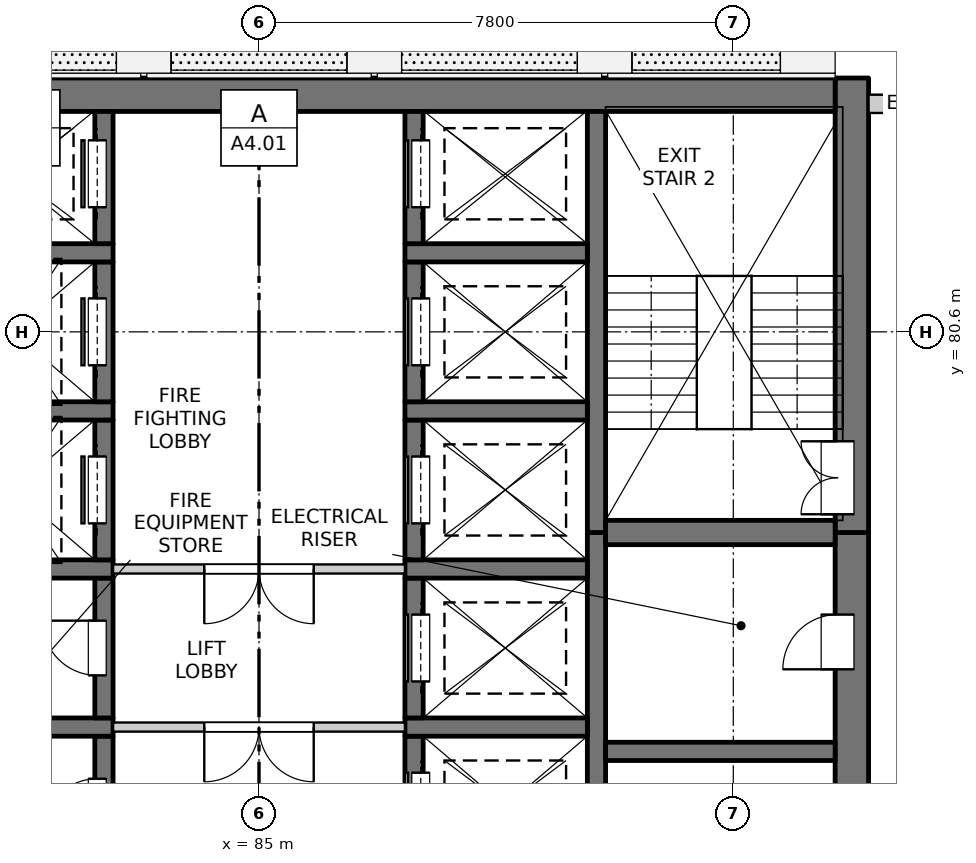
"""IFC4 building model, lengths in metres.
Left out: names, types, materials, properties, quantities, classifications, styles, units other than length and angle.
Written with IfcOpenShell. Run it as: python <this file> out.ifc"""

import sys

from ifc_helpers import new_model, si_unit, direction, frame, frame_2d, origin, place, context, subcontext, project, spatial, rectangle, extrude, element, fill, save


model = new_model("IFC4")
c1 = context("Model", 3, precision=1e-05, world=origin(), true_north=direction((0.0, 1.0)))
c2 = subcontext(c1, "Body", "Model", "MODEL_VIEW")
j1 = project(units=[si_unit("LENGTHUNIT", "METRE"), si_unit("PLANEANGLEUNIT", "RADIAN")], contexts=[c1])
p1 = place(None, origin())
s1 = spatial("IfcSite", under=j1, at=p1, CompositionType="ELEMENT")
p2 = place(p1, origin())
s2 = spatial("IfcBuilding", under=s1, at=p2, CompositionType="ELEMENT")
p3 = place(p2, frame((0.0, 0.0, 182.6)))
s3 = spatial("IfcBuildingStorey", under=s2, at=p3, CompositionType="ELEMENT", Elevation=182.6)
p4 = place(p3, frame((94.75, 61.95, -0.25), z_axis=(0.0, 0.0, 1.0), x_axis=(0.0, 1.0, 0.0)))
e1 = element("IfcWall", 1, at=p4, inside=s3, PredefinedType="SOLIDWALL", context=c2, shape_type="SweptSolid", body=[
    extrude(rectangle(XDim=15.35, YDim=0.55, at=frame_2d((7.675, 0.0))), origin(), (0.0, 0.0, 1.0), 3.4),
])
p5 = place(p4, frame((0.925, 0.0, 0.25)))
e2 = element("IfcOpeningElement", 2, at=p5, cuts=e1, PredefinedType="OPENING", context=c2, shape_type="SweptSolid", body=[
    extrude(rectangle(XDim=0.9, YDim=2.1, at=frame_2d((0.45, 1.05))), frame((0.0, 0.285, 0.0), z_axis=(0.0, -1.0, 0.0), x_axis=(1.0, 0.0, 0.0)), (0.0, 0.0, 1.0), 0.57),
])
p6 = place(p4, frame((6.8, 0.0, 0.25)))
e3 = element("IfcOpeningElement", 3, at=p6, cuts=e1, PredefinedType="OPENING", context=c2, shape_type="SweptSolid", body=[
    extrude(rectangle(XDim=0.9, YDim=2.1, at=frame_2d((0.45, 1.05))), frame((0.0, 0.285, 0.0), z_axis=(0.0, -1.0, 0.0), x_axis=(1.0, 0.0, 0.0)), (0.0, 0.0, 1.0), 0.57),
])
p7 = place(p4, frame((13.1, 0.0, 0.25)))
e4 = element("IfcOpeningElement", 4, at=p7, cuts=e1, PredefinedType="OPENING", context=c2, shape_type="SweptSolid", body=[
    extrude(rectangle(XDim=0.9, YDim=2.1, at=frame_2d((0.45, 1.05))), frame((0.0, 0.285, 0.0), z_axis=(0.0, -1.0, 0.0), x_axis=(1.0, 0.0, 0.0)), (0.0, 0.0, 1.0), 0.57),
])
p8 = place(p3, frame((94.75, 77.3, -0.25), z_axis=(0.0, 0.0, 1.0), x_axis=(0.0, 1.0, 0.0)))
e5 = element("IfcWall", 5, at=p8, inside=s3, PredefinedType="SOLIDWALL", context=c2, shape_type="SweptSolid", body=[
    extrude(rectangle(XDim=7.475, YDim=0.55, at=frame_2d((3.737, 0.0))), origin(), (0.0, 0.0, 1.0), 3.4),
])
p9 = place(p8, frame((0.3, 0.0, 0.25)))
e6 = element("IfcOpeningElement", 6, at=p9, cuts=e5, PredefinedType="OPENING", context=c2, shape_type="SweptSolid", body=[
    extrude(rectangle(XDim=1.2, YDim=2.1, at=frame_2d((0.6, 1.05))), frame((0.0, 0.285, 0.0), z_axis=(0.0, -1.0, 0.0), x_axis=(1.0, 0.0, 0.0)), (0.0, 0.0, 1.0), 0.57),
])
p10 = place(p3, frame((75.525, 84.5, -0.25), z_axis=(0.0, 0.0, 1.0), x_axis=(1.0, 0.0, 0.0)))
e7 = element("IfcWall", 7, at=p10, inside=s3, PredefinedType="SOLIDWALL", context=c2, shape_type="SweptSolid", body=[
    extrude(rectangle(XDim=18.95, YDim=0.55, at=frame_2d((9.475, 0.0))), origin(), (0.0, 0.0, 1.0), 3.4),
])
p11 = place(p3, frame((90.55, 61.95, -0.25), z_axis=(0.0, 0.0, 1.0), x_axis=(0.0, 1.0, 0.0)))
e8 = element("IfcWall", 8, at=p11, inside=s3, PredefinedType="SOLIDWALL", context=c2, shape_type="SweptSolid", body=[
    extrude(rectangle(XDim=15.35, YDim=0.3, at=frame_2d((7.675, 0.0))), origin(), (0.0, 0.0, 1.0), 3.4),
])
p12 = place(p3, frame((90.55, 77.3, -0.25), z_axis=(0.0, 0.0, 1.0), x_axis=(0.0, 1.0, 0.0)))
e9 = element("IfcWall", 9, at=p12, inside=s3, PredefinedType="SOLIDWALL", context=c2, shape_type="SweptSolid", body=[
    extrude(rectangle(XDim=6.925, YDim=0.3, at=frame_2d((3.462, 0.0))), origin(), (0.0, 0.0, 1.0), 3.4),
])
p13 = place(p3, frame((82.45, 71.65, -0.25), z_axis=(0.0, 0.0, 1.0), x_axis=(0.0, 1.0, 0.0)))
e10 = element("IfcWall", 10, at=p13, inside=s3, PredefinedType="SOLIDWALL", context=c2, shape_type="SweptSolid", body=[
    extrude(rectangle(XDim=2.3, YDim=0.3, at=frame_2d((1.15, 0.0))), origin(), (0.0, 0.0, 1.0), 3.4),
])
p14 = place(p13, frame((0.7, 0.0, 0.25)))
e11 = element("IfcOpeningElement", 11, at=p14, cuts=e10, PredefinedType="OPENING", context=c2, shape_type="SweptSolid", body=[
    extrude(rectangle(XDim=0.9, YDim=2.1, at=frame_2d((0.45, 1.05))), frame((0.0, 0.16, 0.0), z_axis=(0.0, -1.0, 0.0), x_axis=(1.0, 0.0, 0.0)), (0.0, 0.0, 1.0), 0.32),
])
p15 = place(p3, frame((79.6, 74.1, -0.25), z_axis=(0.0, 0.0, 1.0), x_axis=(1.0, 0.0, 0.0)))
e12 = element("IfcWall", 12, at=p15, inside=s3, PredefinedType="SOLIDWALL", context=c2, shape_type="SweptSolid", body=[
    extrude(rectangle(XDim=3.0, YDim=0.3, at=frame_2d((1.5, 0.0))), origin(), (0.0, 0.0, 1.0), 3.4),
])
p16 = place(p3, frame((82.45, 74.25, -0.25), z_axis=(0.0, 0.0, 1.0), x_axis=(0.0, 1.0, 0.0)))
e13 = element("IfcWall", 13, at=p16, inside=s3, PredefinedType="SOLIDWALL", context=c2, shape_type="SweptSolid", body=[
    extrude(rectangle(XDim=2.3, YDim=0.3, at=frame_2d((1.15, 0.0))), origin(), (0.0, 0.0, 1.0), 3.4),
])
p17 = place(p16, frame((0.7, 0.0, 0.25)))
e14 = element("IfcOpeningElement", 14, at=p17, cuts=e13, PredefinedType="OPENING", context=c2, shape_type="SweptSolid", body=[
    extrude(rectangle(XDim=0.9, YDim=2.1, at=frame_2d((0.45, 1.05))), frame((0.0, 0.16, 0.0), z_axis=(0.0, -1.0, 0.0), x_axis=(1.0, 0.0, 0.0)), (0.0, 0.0, 1.0), 0.32),
])
p18 = place(p3, frame((79.6, 76.7, -0.25), z_axis=(0.0, 0.0, 1.0), x_axis=(1.0, 0.0, 0.0)))
e15 = element("IfcWall", 15, at=p18, inside=s3, PredefinedType="SOLIDWALL", context=c2, shape_type="SweptSolid", body=[
    extrude(rectangle(XDim=3.0, YDim=0.3, at=frame_2d((1.5, 0.0))), origin(), (0.0, 0.0, 1.0), 3.4),
])
p19 = place(p3, frame((82.45, 76.85, -0.25), z_axis=(0.0, 0.0, 1.0), x_axis=(0.0, 1.0, 0.0)))
e16 = element("IfcWall", 16, at=p19, inside=s3, PredefinedType="SOLIDWALL", context=c2, shape_type="SweptSolid", body=[
    extrude(rectangle(XDim=2.3, YDim=0.3, at=frame_2d((1.15, 0.0))), origin(), (0.0, 0.0, 1.0), 3.4),
])
p20 = place(p19, frame((0.6, 0.0, 0.25)))
e17 = element("IfcOpeningElement", 17, at=p20, cuts=e16, PredefinedType="OPENING", context=c2, shape_type="SweptSolid", body=[
    extrude(rectangle(XDim=1.1, YDim=2.1, at=frame_2d((0.55, 1.05))), frame((0.0, 0.16, 0.0), z_axis=(0.0, -1.0, 0.0), x_axis=(1.0, 0.0, 0.0)), (0.0, 0.0, 1.0), 0.32),
])
p21 = place(p3, frame((79.6, 79.3, -0.25), z_axis=(0.0, 0.0, 1.0), x_axis=(1.0, 0.0, 0.0)))
e18 = element("IfcWall", 18, at=p21, inside=s3, PredefinedType="SOLIDWALL", context=c2, shape_type="SweptSolid", body=[
    extrude(rectangle(XDim=3.0, YDim=0.3, at=frame_2d((1.5, 0.0))), origin(), (0.0, 0.0, 1.0), 3.4),
])
p22 = place(p3, frame((82.45, 79.45, -0.25), z_axis=(0.0, 0.0, 1.0), x_axis=(0.0, 1.0, 0.0)))
e19 = element("IfcWall", 19, at=p22, inside=s3, PredefinedType="SOLIDWALL", context=c2, shape_type="SweptSolid", body=[
    extrude(rectangle(XDim=2.3, YDim=0.3, at=frame_2d((1.15, 0.0))), origin(), (0.0, 0.0, 1.0), 3.4),
])
p23 = place(p22, frame((0.6, 0.0, 0.25)))
e20 = element("IfcOpeningElement", 20, at=p23, cuts=e19, PredefinedType="OPENING", context=c2, shape_type="SweptSolid", body=[
    extrude(rectangle(XDim=1.1, YDim=2.1, at=frame_2d((0.55, 1.05))), frame((0.0, 0.16, 0.0), z_axis=(0.0, -1.0, 0.0), x_axis=(1.0, 0.0, 0.0)), (0.0, 0.0, 1.0), 0.32),
])
p24 = place(p3, frame((79.6, 81.9, -0.25), z_axis=(0.0, 0.0, 1.0), x_axis=(1.0, 0.0, 0.0)))
e21 = element("IfcWall", 21, at=p24, inside=s3, PredefinedType="SOLIDWALL", context=c2, shape_type="SweptSolid", body=[
    extrude(rectangle(XDim=3.0, YDim=0.3, at=frame_2d((1.5, 0.0))), origin(), (0.0, 0.0, 1.0), 3.4),
])
p25 = place(p3, frame((82.45, 82.05, -0.25), z_axis=(0.0, 0.0, 1.0), x_axis=(0.0, 1.0, 0.0)))
e22 = element("IfcWall", 22, at=p25, inside=s3, PredefinedType="SOLIDWALL", context=c2, shape_type="SweptSolid", body=[
    extrude(rectangle(XDim=2.175, YDim=0.3, at=frame_2d((1.087, 0.0))), origin(), (0.0, 0.0, 1.0), 3.4),
])
p26 = place(p25, frame((0.6, 0.0, 0.25)))
e23 = element("IfcOpeningElement", 23, at=p26, cuts=e22, PredefinedType="OPENING", context=c2, shape_type="SweptSolid", body=[
    extrude(rectangle(XDim=1.1, YDim=2.1, at=frame_2d((0.55, 1.05))), frame((0.0, 0.16, 0.0), z_axis=(0.0, -1.0, 0.0), x_axis=(1.0, 0.0, 0.0)), (0.0, 0.0, 1.0), 0.32),
])
p27 = place(p3, frame((87.55, 71.65, -0.25), z_axis=(0.0, 0.0, 1.0), x_axis=(0.0, 1.0, 0.0)))
e24 = element("IfcWall", 24, at=p27, inside=s3, PredefinedType="SOLIDWALL", context=c2, shape_type="SweptSolid", body=[
    extrude(rectangle(XDim=2.3, YDim=0.3, at=frame_2d((1.15, 0.0))), origin(), (0.0, 0.0, 1.0), 3.4),
])
p28 = place(p27, frame((0.6, 0.0, 0.25)))
e25 = element("IfcOpeningElement", 25, at=p28, cuts=e24, PredefinedType="OPENING", context=c2, shape_type="SweptSolid", body=[
    extrude(rectangle(XDim=1.1, YDim=2.1, at=frame_2d((0.55, 1.05))), frame((0.0, 0.16, 0.0), z_axis=(0.0, -1.0, 0.0), x_axis=(1.0, 0.0, 0.0)), (0.0, 0.0, 1.0), 0.32),
])
p29 = place(p3, frame((87.4, 74.1, -0.25), z_axis=(0.0, 0.0, 1.0), x_axis=(1.0, 0.0, 0.0)))
e26 = element("IfcWall", 26, at=p29, inside=s3, PredefinedType="SOLIDWALL", context=c2, shape_type="SweptSolid", body=[
    extrude(rectangle(XDim=3.0, YDim=0.3, at=frame_2d((1.5, 0.0))), origin(), (0.0, 0.0, 1.0), 3.4),
])
p30 = place(p3, frame((87.55, 74.25, -0.25), z_axis=(0.0, 0.0, 1.0), x_axis=(0.0, 1.0, 0.0)))
e27 = element("IfcWall", 27, at=p30, inside=s3, PredefinedType="SOLIDWALL", context=c2, shape_type="SweptSolid", body=[
    extrude(rectangle(XDim=2.3, YDim=0.3, at=frame_2d((1.15, 0.0))), origin(), (0.0, 0.0, 1.0), 3.4),
])
p31 = place(p30, frame((0.6, 0.0, 0.25)))
e28 = element("IfcOpeningElement", 28, at=p31, cuts=e27, PredefinedType="OPENING", context=c2, shape_type="SweptSolid", body=[
    extrude(rectangle(XDim=1.1, YDim=2.1, at=frame_2d((0.55, 1.05))), frame((0.0, 0.16, 0.0), z_axis=(0.0, -1.0, 0.0), x_axis=(1.0, 0.0, 0.0)), (0.0, 0.0, 1.0), 0.32),
])
p32 = place(p3, frame((87.4, 76.7, -0.25), z_axis=(0.0, 0.0, 1.0), x_axis=(1.0, 0.0, 0.0)))
e29 = element("IfcWall", 29, at=p32, inside=s3, PredefinedType="SOLIDWALL", context=c2, shape_type="SweptSolid", body=[
    extrude(rectangle(XDim=3.0, YDim=0.3, at=frame_2d((1.5, 0.0))), origin(), (0.0, 0.0, 1.0), 3.4),
])
p33 = place(p3, frame((87.55, 76.85, -0.25), z_axis=(0.0, 0.0, 1.0), x_axis=(0.0, 1.0, 0.0)))
e30 = element("IfcWall", 30, at=p33, inside=s3, PredefinedType="SOLIDWALL", context=c2, shape_type="SweptSolid", body=[
    extrude(rectangle(XDim=2.3, YDim=0.3, at=frame_2d((1.15, 0.0))), origin(), (0.0, 0.0, 1.0), 3.4),
])
p34 = place(p33, frame((0.6, 0.0, 0.25)))
e31 = element("IfcOpeningElement", 31, at=p34, cuts=e30, PredefinedType="OPENING", context=c2, shape_type="SweptSolid", body=[
    extrude(rectangle(XDim=1.1, YDim=2.1, at=frame_2d((0.55, 1.05))), frame((0.0, 0.16, 0.0), z_axis=(0.0, -1.0, 0.0), x_axis=(1.0, 0.0, 0.0)), (0.0, 0.0, 1.0), 0.32),
])
p35 = place(p3, frame((87.4, 79.3, -0.25), z_axis=(0.0, 0.0, 1.0), x_axis=(1.0, 0.0, 0.0)))
e32 = element("IfcWall", 32, at=p35, inside=s3, PredefinedType="SOLIDWALL", context=c2, shape_type="SweptSolid", body=[
    extrude(rectangle(XDim=3.0, YDim=0.3, at=frame_2d((1.5, 0.0))), origin(), (0.0, 0.0, 1.0), 3.4),
])
p36 = place(p3, frame((87.55, 79.45, -0.25), z_axis=(0.0, 0.0, 1.0), x_axis=(0.0, 1.0, 0.0)))
e33 = element("IfcWall", 33, at=p36, inside=s3, PredefinedType="SOLIDWALL", context=c2, shape_type="SweptSolid", body=[
    extrude(rectangle(XDim=2.3, YDim=0.3, at=frame_2d((1.15, 0.0))), origin(), (0.0, 0.0, 1.0), 3.4),
])
p37 = place(p36, frame((0.6, 0.0, 0.25)))
e34 = element("IfcOpeningElement", 34, at=p37, cuts=e33, PredefinedType="OPENING", context=c2, shape_type="SweptSolid", body=[
    extrude(rectangle(XDim=1.1, YDim=2.1, at=frame_2d((0.55, 1.05))), frame((0.0, 0.16, 0.0), z_axis=(0.0, -1.0, 0.0), x_axis=(1.0, 0.0, 0.0)), (0.0, 0.0, 1.0), 0.32),
])
p38 = place(p3, frame((87.4, 81.9, -0.25), z_axis=(0.0, 0.0, 1.0), x_axis=(1.0, 0.0, 0.0)))
e35 = element("IfcWall", 35, at=p38, inside=s3, PredefinedType="SOLIDWALL", context=c2, shape_type="SweptSolid", body=[
    extrude(rectangle(XDim=3.0, YDim=0.3, at=frame_2d((1.5, 0.0))), origin(), (0.0, 0.0, 1.0), 3.4),
])
p39 = place(p3, frame((87.55, 82.05, -0.25), z_axis=(0.0, 0.0, 1.0), x_axis=(0.0, 1.0, 0.0)))
e36 = element("IfcWall", 36, at=p39, inside=s3, PredefinedType="SOLIDWALL", context=c2, shape_type="SweptSolid", body=[
    extrude(rectangle(XDim=2.175, YDim=0.3, at=frame_2d((1.087, 0.0))), origin(), (0.0, 0.0, 1.0), 3.4),
])
p40 = place(p39, frame((0.6, 0.0, 0.25)))
e37 = element("IfcOpeningElement", 37, at=p40, cuts=e36, PredefinedType="OPENING", context=c2, shape_type="SweptSolid", body=[
    extrude(rectangle(XDim=1.1, YDim=2.1, at=frame_2d((0.55, 1.05))), frame((0.0, 0.16, 0.0), z_axis=(0.0, -1.0, 0.0), x_axis=(1.0, 0.0, 0.0)), (0.0, 0.0, 1.0), 0.32),
])
p41 = place(p3, frame((90.7, 73.7, -0.25), z_axis=(0.0, 0.0, 1.0), x_axis=(1.0, 0.0, 0.0)))
e38 = element("IfcWall", 38, at=p41, inside=s3, PredefinedType="SOLIDWALL", context=c2, shape_type="SweptSolid", body=[
    extrude(rectangle(XDim=3.775, YDim=0.3, at=frame_2d((1.888, 0.0))), origin(), (0.0, 0.0, 1.0), 3.4),
])
p42 = place(p3, frame((90.7, 77.3, -0.25), z_axis=(0.0, 0.0, 1.0), x_axis=(1.0, 0.0, 0.0)))
e39 = element("IfcWall", 39, at=p42, inside=s3, PredefinedType="SOLIDWALL", context=c2, shape_type="SweptSolid", body=[
    extrude(rectangle(XDim=3.775, YDim=0.4, at=frame_2d((1.888, 0.0))), origin(), (0.0, 0.0, 1.0), 3.4),
])
p43 = place(p3, frame((95.025, 84.35, 0.0), z_axis=(0.0, 0.0, 1.0), x_axis=(1.0, 0.0, 0.0)))
e40 = element("IfcWall", 40, at=p43, inside=s3, PredefinedType="SOLIDWALL", context=c2, shape_type="SweptSolid", body=[
    extrude(rectangle(XDim=1.3, YDim=0.3, at=frame_2d((0.65, 0.0))), origin(), (0.0, 0.0, 1.0), 2.7),
])
p44 = place(p3, frame((82.6, 74.1, 0.0), z_axis=(0.0, 0.0, 1.0), x_axis=(1.0, 0.0, 0.0)))
e41 = element("IfcWall", 41, at=p44, inside=s3, PredefinedType="PARTITIONING", context=c2, shape_type="SweptSolid", body=[
    extrude(rectangle(XDim=4.8, YDim=0.15, at=frame_2d((2.4, 0.0))), origin(), (0.0, 0.0, 1.0), 3.15),
])
p45 = place(p44, frame((1.5, 0.0, 0.0)))
e42 = element("IfcOpeningElement", 42, at=p45, cuts=e41, PredefinedType="OPENING", context=c2, shape_type="SweptSolid", body=[
    extrude(rectangle(XDim=1.8, YDim=2.1, at=frame_2d((0.9, 1.05))), frame((0.0, 0.085, 0.0), z_axis=(0.0, -1.0, 0.0), x_axis=(1.0, 0.0, 0.0)), (0.0, 0.0, 1.0), 0.17),
])
p46 = place(p3, frame((82.6, 76.7, 0.0), z_axis=(0.0, 0.0, 1.0), x_axis=(1.0, 0.0, 0.0)))
e43 = element("IfcWall", 43, at=p46, inside=s3, PredefinedType="PARTITIONING", context=c2, shape_type="SweptSolid", body=[
    extrude(rectangle(XDim=4.8, YDim=0.15, at=frame_2d((2.4, 0.0))), origin(), (0.0, 0.0, 1.0), 3.15),
])
p47 = place(p46, frame((1.5, 0.0, 0.0)))
e44 = element("IfcOpeningElement", 44, at=p47, cuts=e43, PredefinedType="OPENING", context=c2, shape_type="SweptSolid", body=[
    extrude(rectangle(XDim=1.8, YDim=2.1, at=frame_2d((0.9, 1.05))), frame((0.0, 0.085, 0.0), z_axis=(0.0, -1.0, 0.0), x_axis=(1.0, 0.0, 0.0)), (0.0, 0.0, 1.0), 0.17),
])
p48 = place(p14, origin())
e45 = element("IfcDoor", 45, at=p48, inside=s3, OperationType="SINGLE_SWING_LEFT", PredefinedType="DOOR", context=c2, shape_type="SweptSolid", body=[
    extrude(rectangle(XDim=0.9, YDim=2.1, at=frame_2d((0.45, 1.05))), frame((0.0, 0.135, 0.0), z_axis=(0.0, -1.0, 0.0), x_axis=(1.0, 0.0, 0.0)), (0.0, 0.0, 1.0), 0.05),
])
fill(e11, e45)
p49 = place(p28, origin())
e46 = element("IfcDoor", 46, at=p49, inside=s3, OperationType="SLIDING_TO_LEFT", PredefinedType="DOOR", context=c2, shape_type="SweptSolid", body=[
    extrude(rectangle(XDim=1.1, YDim=2.1, at=frame_2d((0.55, 1.05))), frame((0.0, -0.085, 0.0), z_axis=(0.0, -1.0, 0.0), x_axis=(1.0, 0.0, 0.0)), (0.0, 0.0, 1.0), 0.05),
])
fill(e25, e46)
p50 = place(p45, origin())
e47 = element("IfcDoor", 47, at=p50, inside=s3, OperationType="DOUBLE_DOOR_SINGLE_SWING", PredefinedType="DOOR", context=c2, shape_type="SweptSolid", body=[
    extrude(rectangle(XDim=1.8, YDim=2.1, at=frame_2d((0.9, 1.05))), frame((0.0, 0.025, 0.0), z_axis=(0.0, -1.0, 0.0), x_axis=(1.0, 0.0, 0.0)), (0.0, 0.0, 1.0), 0.05),
])
fill(e42, e47)
p51 = place(p17, origin())
e48 = element("IfcDoor", 48, at=p51, inside=s3, OperationType="SINGLE_SWING_RIGHT", PredefinedType="DOOR", context=c2, shape_type="SweptSolid", body=[
    extrude(rectangle(XDim=0.9, YDim=2.1, at=frame_2d((0.45, 1.05))), frame((0.0, 0.135, 0.0), z_axis=(0.0, -1.0, 0.0), x_axis=(1.0, 0.0, 0.0)), (0.0, 0.0, 1.0), 0.05),
])
fill(e14, e48)
p52 = place(p31, origin())
e49 = element("IfcDoor", 49, at=p52, inside=s3, OperationType="SLIDING_TO_LEFT", PredefinedType="DOOR", context=c2, shape_type="SweptSolid", body=[
    extrude(rectangle(XDim=1.1, YDim=2.1, at=frame_2d((0.55, 1.05))), frame((0.0, -0.085, 0.0), z_axis=(0.0, -1.0, 0.0), x_axis=(1.0, 0.0, 0.0)), (0.0, 0.0, 1.0), 0.05),
])
fill(e28, e49)
p53 = place(p7, origin())
e50 = element("IfcDoor", 50, at=p53, inside=s3, OperationType="SINGLE_SWING_LEFT", PredefinedType="DOOR", context=c2, shape_type="SweptSolid", body=[
    extrude(rectangle(XDim=0.9, YDim=2.1, at=frame_2d((0.45, 1.05))), frame((0.0, 0.26, 0.0), z_axis=(0.0, -1.0, 0.0), x_axis=(1.0, 0.0, 0.0)), (0.0, 0.0, 1.0), 0.05),
])
fill(e4, e50)
p54 = place(p47, origin())
e51 = element("IfcDoor", 51, at=p54, inside=s3, OperationType="DOUBLE_DOOR_SINGLE_SWING", PredefinedType="DOOR", context=c2, shape_type="SweptSolid", body=[
    extrude(rectangle(XDim=1.8, YDim=2.1, at=frame_2d((0.9, 1.05))), frame((0.0, 0.025, 0.0), z_axis=(0.0, -1.0, 0.0), x_axis=(1.0, 0.0, 0.0)), (0.0, 0.0, 1.0), 0.05),
])
fill(e44, e51)
p55 = place(p20, origin())
e52 = element("IfcDoor", 52, at=p55, inside=s3, OperationType="SLIDING_TO_LEFT", PredefinedType="DOOR", context=c2, shape_type="SweptSolid", body=[
    extrude(rectangle(XDim=1.1, YDim=2.1, at=frame_2d((0.55, 1.05))), frame((0.0, 0.135, 0.0), z_axis=(0.0, -1.0, 0.0), x_axis=(1.0, 0.0, 0.0)), (0.0, 0.0, 1.0), 0.05),
])
fill(e17, e52)
p56 = place(p34, origin())
e53 = element("IfcDoor", 53, at=p56, inside=s3, OperationType="SLIDING_TO_LEFT", PredefinedType="DOOR", context=c2, shape_type="SweptSolid", body=[
    extrude(rectangle(XDim=1.1, YDim=2.1, at=frame_2d((0.55, 1.05))), frame((0.0, -0.085, 0.0), z_axis=(0.0, -1.0, 0.0), x_axis=(1.0, 0.0, 0.0)), (0.0, 0.0, 1.0), 0.05),
])
fill(e31, e53)
p57 = place(p9, origin())
e54 = element("IfcDoor", 54, at=p57, inside=s3, OperationType="DOUBLE_DOOR_SINGLE_SWING", PredefinedType="DOOR", context=c2, shape_type="SweptSolid", body=[
    extrude(rectangle(XDim=1.2, YDim=2.1, at=frame_2d((0.6, 1.05))), frame((0.0, 0.26, 0.0), z_axis=(0.0, -1.0, 0.0), x_axis=(1.0, 0.0, 0.0)), (0.0, 0.0, 1.0), 0.05),
])
fill(e6, e54)
p58 = place(p23, origin())
e55 = element("IfcDoor", 55, at=p58, inside=s3, OperationType="SLIDING_TO_LEFT", PredefinedType="DOOR", context=c2, shape_type="SweptSolid", body=[
    extrude(rectangle(XDim=1.1, YDim=2.1, at=frame_2d((0.55, 1.05))), frame((0.0, 0.135, 0.0), z_axis=(0.0, -1.0, 0.0), x_axis=(1.0, 0.0, 0.0)), (0.0, 0.0, 1.0), 0.05),
])
fill(e20, e55)
p59 = place(p37, origin())
e56 = element("IfcDoor", 56, at=p59, inside=s3, OperationType="SLIDING_TO_RIGHT", PredefinedType="DOOR", context=c2, shape_type="SweptSolid", body=[
    extrude(rectangle(XDim=1.1, YDim=2.1, at=frame_2d((0.55, 1.05))), frame((0.0, -0.085, 0.0), z_axis=(0.0, -1.0, 0.0), x_axis=(1.0, 0.0, 0.0)), (0.0, 0.0, 1.0), 0.05),
])
fill(e34, e56)
p60 = place(p26, origin())
e57 = element("IfcDoor", 57, at=p60, inside=s3, OperationType="SLIDING_TO_RIGHT", PredefinedType="DOOR", context=c2, shape_type="SweptSolid", body=[
    extrude(rectangle(XDim=1.1, YDim=2.1, at=frame_2d((0.55, 1.05))), frame((0.0, 0.135, 0.0), z_axis=(0.0, -1.0, 0.0), x_axis=(1.0, 0.0, 0.0)), (0.0, 0.0, 1.0), 0.05),
])
fill(e23, e57)
p61 = place(p40, origin())
e58 = element("IfcDoor", 58, at=p61, inside=s3, OperationType="SLIDING_TO_RIGHT", PredefinedType="DOOR", context=c2, shape_type="SweptSolid", body=[
    extrude(rectangle(XDim=1.1, YDim=2.1, at=frame_2d((0.55, 1.05))), frame((0.0, -0.085, 0.0), z_axis=(0.0, -1.0, 0.0), x_axis=(1.0, 0.0, 0.0)), (0.0, 0.0, 1.0), 0.05),
])
fill(e37, e58)
save(model, sys.argv[1])
